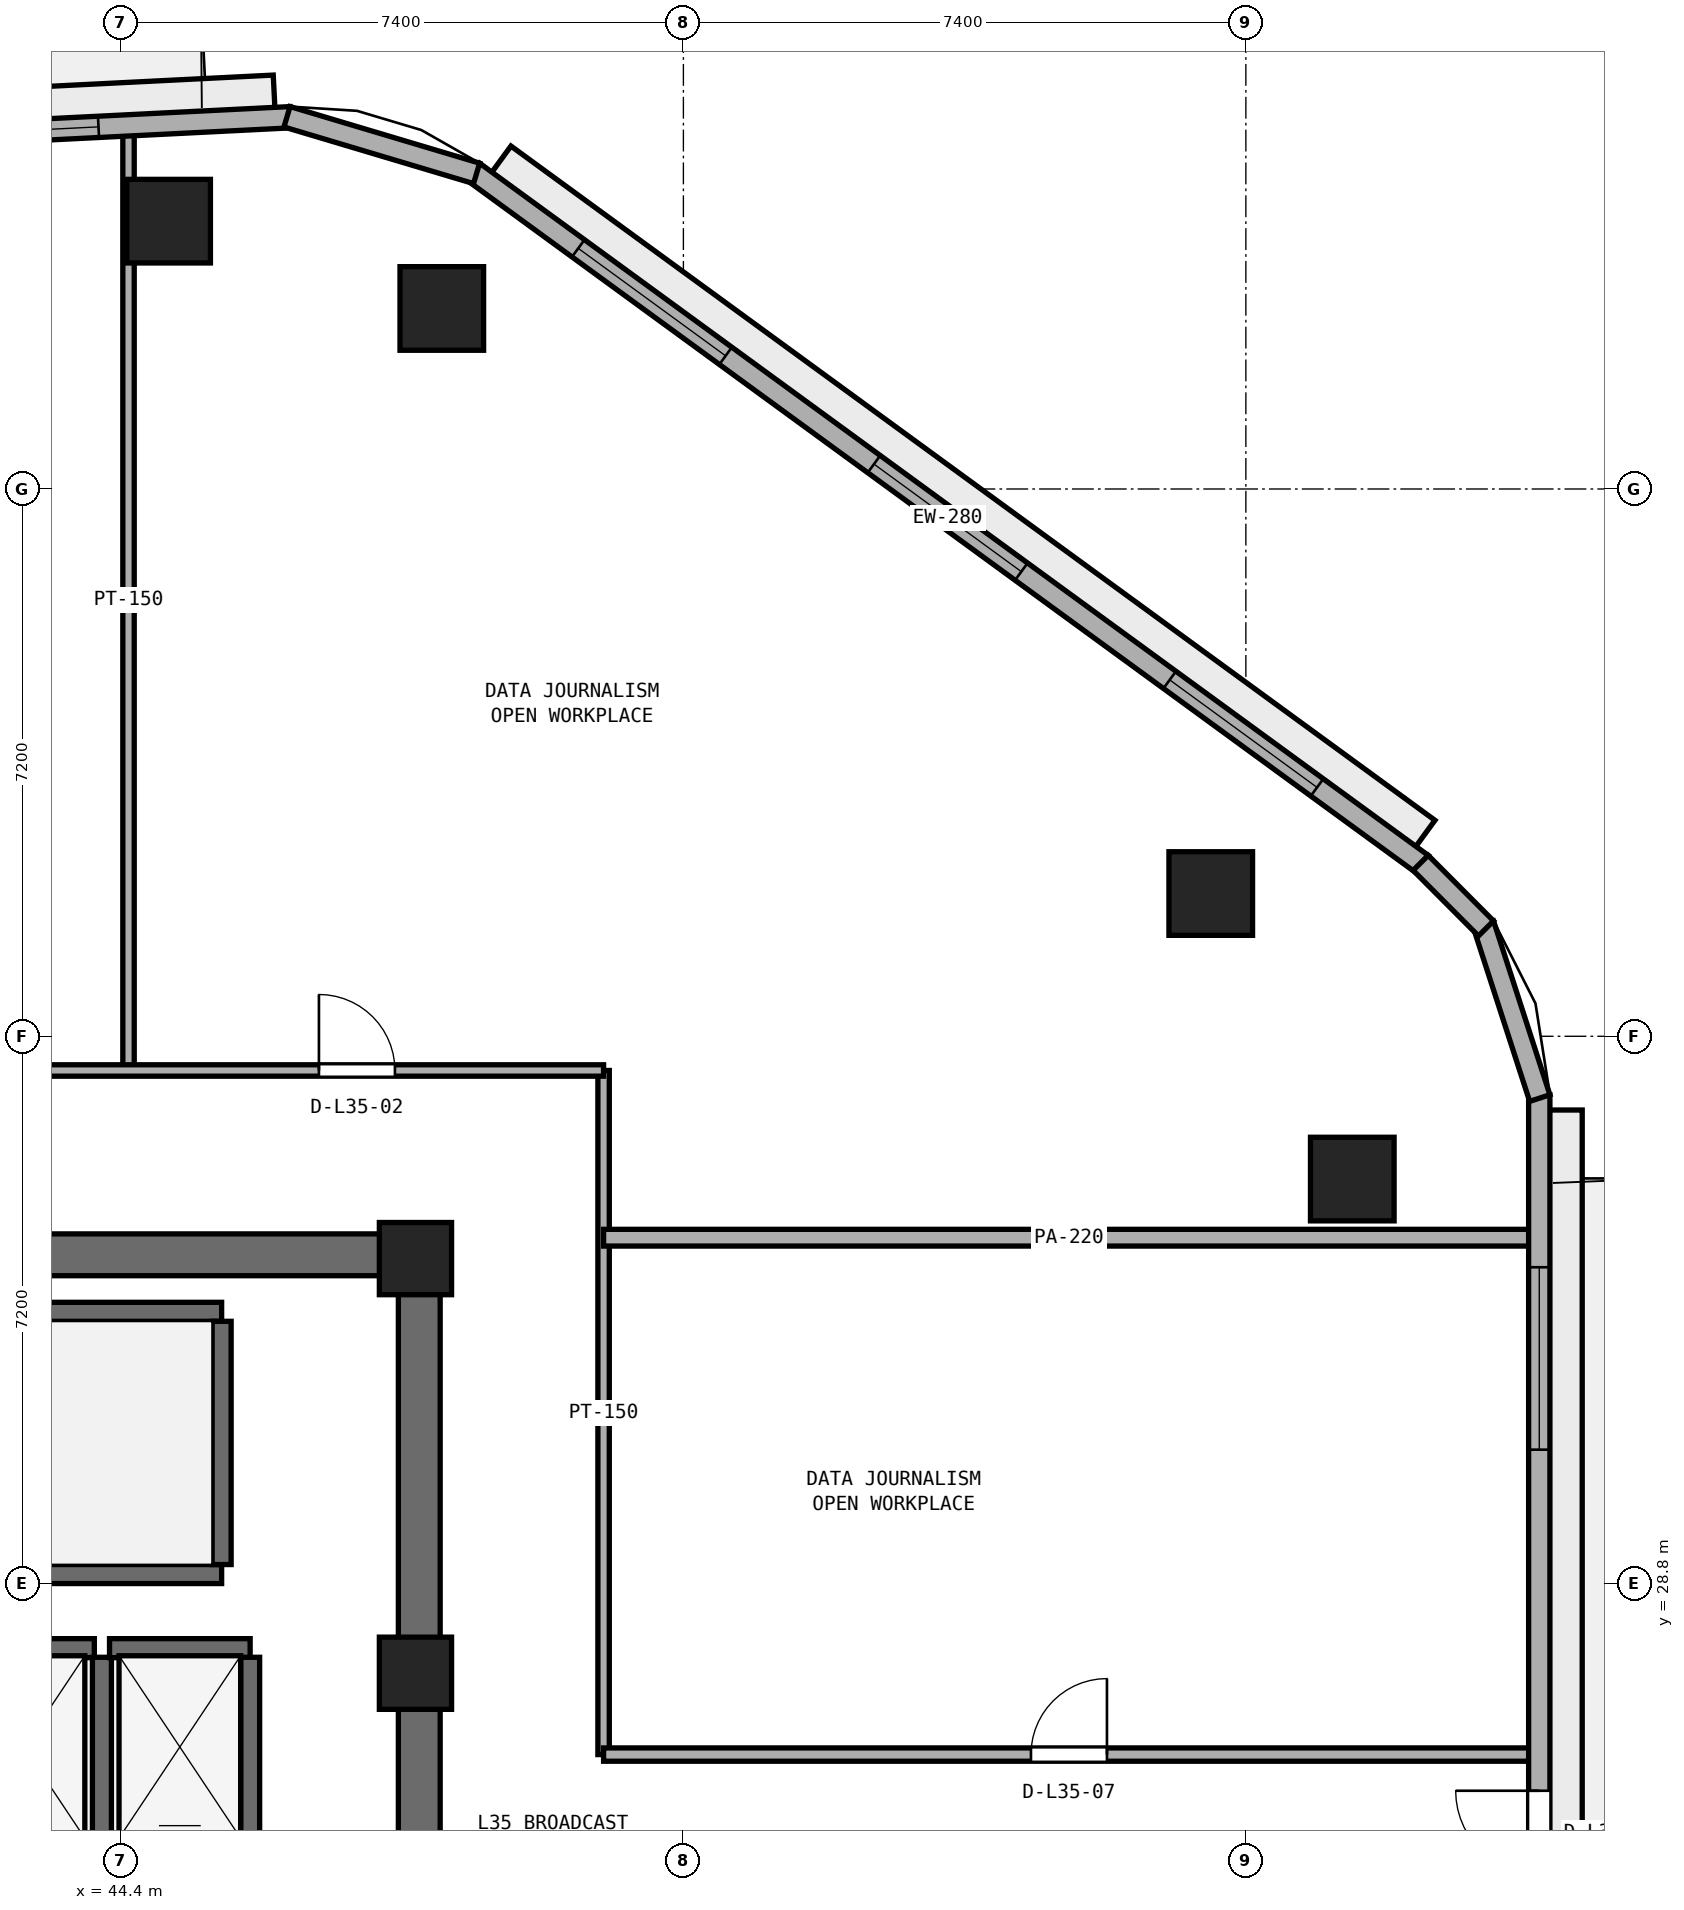
"""IFC4 building model, lengths in metres.
Left out: names, types, materials, properties, quantities, classifications, styles, units other than length and angle.
Written with IfcOpenShell. Run it as: python <this file> out.ifc"""

import sys

from ifc_helpers import new_model, si_unit, direction, frame, frame_2d, origin, origin_2d, place, context, subcontext, project, spatial, rectangle, extrude, element, fill, save


model = new_model("IFC4")
c1 = context("Model", 3, precision=1e-05, world=origin(), true_north=direction((0.0, 1.0)))
c2 = subcontext(c1, "Body", "Model", "MODEL_VIEW")
j1 = project(units=[si_unit("LENGTHUNIT", "METRE"), si_unit("PLANEANGLEUNIT", "RADIAN")], contexts=[c1])
p1 = place(None, origin())
s1 = spatial("IfcSite", under=j1, at=p1, CompositionType="ELEMENT")
p2 = place(p1, origin())
s2 = spatial("IfcBuilding", under=s1, at=p2, CompositionType="ELEMENT")
p3 = place(p2, frame((0.0, 0.0, 140.2)))
s3 = spatial("IfcBuildingStorey", under=s2, at=p3, CompositionType="ELEMENT", Elevation=140.2)
p4 = place(p3, frame((25.4, 33.125, 0.0), z_axis=(0.0, 0.0, 1.0), x_axis=(1.0, 0.0, 0.0)))
e1 = element("IfcWall", 1, at=p4, inside=s3, PredefinedType="SHEAR", context=c2, shape_type="SweptSolid", body=[
    extrude(rectangle(XDim=23.2, YDim=0.55, at=frame_2d((11.6, 0.0))), origin(), (0.0, 0.0, 1.0), 3.54),
])
p5 = place(p3, frame((48.325, 17.55, 0.0), z_axis=(0.0, 0.0, 1.0), x_axis=(0.0, 1.0, 0.0)))
e2 = element("IfcWall", 2, at=p5, inside=s3, PredefinedType="SHEAR", context=c2, shape_type="SweptSolid", body=[
    extrude(rectangle(XDim=15.3, YDim=0.55, at=frame_2d((7.65, 0.0))), origin(), (0.0, 0.0, 1.0), 3.54),
])
p6 = place(p5, frame((5.75, 0.0, 0.0)))
e3 = element("IfcOpeningElement", 3, at=p6, cuts=e2, PredefinedType="OPENING", context=c2, shape_type="SweptSolid", body=[
    extrude(rectangle(XDim=1.5, YDim=2.15, at=frame_2d((0.75, 1.075))), frame((0.0, 0.285, 0.0), z_axis=(0.0, -1.0, 0.0), x_axis=(1.0, 0.0, 0.0)), (0.0, 0.0, 1.0), 0.57),
])
for number, where, z_axis, x_axis in (
    (4, (48.275, 27.62, 0.0), (0.0, 0.0, 1.0), (1.0, 0.0, 0.0)),
    (5, (48.275, 33.075, 0.0), (0.0, 0.0, 1.0), (1.0, 0.0, 0.0)),
):
    element("IfcColumn", number, at=place(p3, frame(where, z_axis=z_axis, x_axis=x_axis)), inside=s3, PredefinedType="PILASTER", context=c2, shape_type="SweptSolid", body=[
        extrude(rectangle(XDim=0.95, YDim=0.95, at=origin_2d()), origin(), (0.0, 0.0, 1.0), 3.8),
    ])
for number, where, z_axis, x_axis in (
    (6, (60.6, 34.122, 0.0), (0.0, 0.0, 1.0), (1.0, 0.0, 0.0)),
    (7, (58.738, 37.878, 0.0), (0.0, 0.0, 1.0), (1.0, 0.0, 0.0)),
    (8, (48.622, 45.575, 0.0), (0.0, 0.0, 1.0), (1.0, 0.0, 0.0)),
    (9, (45.028, 46.724, 0.0), (0.0, 0.0, 1.0), (1.0, 0.0, 0.0)),
):
    element("IfcColumn", number, at=place(p3, frame(where, z_axis=z_axis, x_axis=x_axis)), inside=s3, PredefinedType="COLUMN", context=c2, shape_type="SweptSolid", body=[
        extrude(rectangle(XDim=1.1, YDim=1.1, at=origin_2d()), origin(), (0.0, 0.0, 1.0), 3.8),
    ])
for number, where, z_axis, x_axis in (
    (10, (38.425, 28.925, 0.0), (0.0, 0.0, 1.0), (1.0, 0.0, 0.0)),
    (11, (38.425, 32.375, 0.0), (0.0, 0.0, 1.0), (1.0, 0.0, 0.0)),
):
    element("IfcWall", number, at=place(p3, frame(where, z_axis=z_axis, x_axis=x_axis)), inside=s3, PredefinedType="SHEAR", context=c2, shape_type="SweptSolid", body=[
        extrude(rectangle(XDim=7.3, YDim=0.25, at=frame_2d((3.65, 0.0))), origin(), (0.0, 0.0, 1.0), 3.54),
    ])
p7 = place(p3, frame((45.725, 29.05, 0.0), z_axis=(0.0, 0.0, 1.0), x_axis=(0.0, 1.0, 0.0)))
e12 = element("IfcWall", 12, at=p7, inside=s3, PredefinedType="SHEAR", context=c2, shape_type="SweptSolid", body=[
    extrude(rectangle(XDim=3.2, YDim=0.25, at=frame_2d((1.6, 0.0))), origin(), (0.0, 0.0, 1.0), 3.54),
])
p8 = place(p3, frame((42.2, 27.95, 0.0), z_axis=(0.0, 0.0, 1.0), x_axis=(1.0, 0.0, 0.0)))
e13 = element("IfcWall", 13, at=p8, inside=s3, PredefinedType="SHEAR", context=c2, shape_type="SweptSolid", body=[
    extrude(rectangle(XDim=1.85, YDim=0.25, at=frame_2d((0.925, 0.0))), origin(), (0.0, 0.0, 1.0), 3.54),
])
p9 = place(p3, frame((44.15, 25.47, 0.0), z_axis=(0.0, 0.0, 1.0), x_axis=(0.0, 1.0, 0.0)))
e14 = element("IfcWall", 14, at=p9, inside=s3, PredefinedType="SHEAR", context=c2, shape_type="SweptSolid", body=[
    extrude(rectangle(XDim=2.36, YDim=0.25, at=frame_2d((1.18, 0.0))), origin(), (0.0, 0.0, 1.0), 3.54),
])
p10 = place(p3, frame((44.25, 27.95, 0.0), z_axis=(0.0, 0.0, 1.0), x_axis=(1.0, 0.0, 0.0)))
e15 = element("IfcWall", 15, at=p10, inside=s3, PredefinedType="SHEAR", context=c2, shape_type="SweptSolid", body=[
    extrude(rectangle(XDim=1.85, YDim=0.25, at=frame_2d((0.925, 0.0))), origin(), (0.0, 0.0, 1.0), 3.54),
])
p11 = place(p3, frame((46.1, 25.47, 0.0), z_axis=(0.0, 0.0, 1.0), x_axis=(0.0, 1.0, 0.0)))
e16 = element("IfcWall", 16, at=p11, inside=s3, PredefinedType="SHEAR", context=c2, shape_type="SweptSolid", body=[
    extrude(rectangle(XDim=2.36, YDim=0.25, at=frame_2d((1.18, 0.0))), origin(), (0.0, 0.0, 1.0), 3.54),
])
p12 = place(p3, frame((50.75, 26.55, 0.0), z_axis=(0.0, 0.0, 1.0), x_axis=(0.0, 1.0, 0.0)))
e17 = element("IfcWall", 17, at=p12, inside=s3, PredefinedType="PARTITIONING", context=c2, shape_type="SweptSolid", body=[
    extrude(rectangle(XDim=9.0, YDim=0.15, at=frame_2d((4.5, 0.0))), origin(), (0.0, 0.0, 1.0), 3.54),
])
p13 = place(p3, frame((44.5, 35.55, 0.0), z_axis=(0.0, 0.0, 1.0), x_axis=(0.0, 1.0, 0.0)))
e18 = element("IfcWall", 18, at=p13, inside=s3, PredefinedType="PARTITIONING", context=c2, shape_type="SweptSolid", body=[
    extrude(rectangle(XDim=12.369, YDim=0.15, at=frame_2d((6.185, 0.0))), origin(), (0.0, 0.0, 1.0), 3.54),
])
p14 = place(p3, frame((50.75, 26.55, 0.0), z_axis=(0.0, 0.0, 1.0), x_axis=(1.0, 0.0, 0.0)))
e19 = element("IfcWall", 19, at=p14, inside=s3, PredefinedType="PARTITIONING", context=c2, shape_type="SweptSolid", body=[
    extrude(rectangle(XDim=12.245, YDim=0.175, at=frame_2d((6.123, 0.0))), origin(), (0.0, 0.0, 1.0), 3.54),
])
p15 = place(p14, frame((5.623, 0.0, 0.0)))
e20 = element("IfcOpeningElement", 20, at=p15, cuts=e19, PredefinedType="OPENING", context=c2, shape_type="SweptSolid", body=[
    extrude(rectangle(XDim=1.0, YDim=2.12, at=frame_2d((0.5, 1.06))), frame((0.0, 0.097, 0.0), z_axis=(0.0, -1.0, 0.0), x_axis=(1.0, 0.0, 0.0)), (0.0, 0.0, 1.0), 0.195),
])
p16 = place(p3, frame((50.75, 33.35, 0.0), z_axis=(0.0, 0.0, 1.0), x_axis=(1.0, 0.0, 0.0)))
e21 = element("IfcWall", 21, at=p16, inside=s3, PredefinedType="PARTITIONING", context=c2, shape_type="SweptSolid", body=[
    extrude(rectangle(XDim=12.245, YDim=0.22, at=frame_2d((6.123, 0.0))), origin(), (0.0, 0.0, 1.0), 2.923),
])
p17 = place(p3, frame((23.25, 35.55, 0.0), z_axis=(0.0, 0.0, 1.0), x_axis=(1.0, 0.0, 0.0)))
e22 = element("IfcWall", 22, at=p17, inside=s3, PredefinedType="PARTITIONING", context=c2, shape_type="SweptSolid", body=[
    extrude(rectangle(XDim=27.5, YDim=0.15, at=frame_2d((13.75, 0.0))), origin(), (0.0, 0.0, 1.0), 3.54),
])
p18 = place(p17, frame((10.245, 0.0, 0.0)))
e23 = element("IfcOpeningElement", 23, at=p18, cuts=e22, PredefinedType="OPENING", context=c2, shape_type="SweptSolid", body=[
    extrude(rectangle(XDim=1.0, YDim=2.12, at=frame_2d((0.5, 1.06))), frame((0.0, 0.085, 0.0), z_axis=(0.0, -1.0, 0.0), x_axis=(1.0, 0.0, 0.0)), (0.0, 0.0, 1.0), 0.17),
])
p19 = place(p17, frame((23.755, 0.0, 0.0)))
e24 = element("IfcOpeningElement", 24, at=p19, cuts=e22, PredefinedType="OPENING", context=c2, shape_type="SweptSolid", body=[
    extrude(rectangle(XDim=1.0, YDim=2.12, at=frame_2d((0.5, 1.06))), frame((0.0, 0.085, 0.0), z_axis=(0.0, -1.0, 0.0), x_axis=(1.0, 0.0, 0.0)), (0.0, 0.0, 1.0), 0.17),
])
p20 = place(p3, frame((63.06, 16.418, 0.0), z_axis=(0.0, 0.0, 1.0), x_axis=(0.0, 1.0, 0.0)))
e25 = element("IfcWall", 25, at=p20, inside=s3, PredefinedType="STANDARD", context=c2, shape_type="SweptSolid", body=[
    extrude(rectangle(XDim=18.812, YDim=0.28, at=frame_2d((9.406, 0.0))), origin(), (0.0, 0.0, 1.0), 3.54),
])
p21 = place(p20, frame((8.556, 0.0, 0.0)))
e26 = element("IfcOpeningElement", 26, at=p21, cuts=e25, PredefinedType="OPENING", context=c2, shape_type="SweptSolid", body=[
    extrude(rectangle(XDim=1.1, YDim=2.2, at=frame_2d((0.55, 1.1))), frame((0.0, 0.15, 0.0), z_axis=(0.0, -1.0, 0.0), x_axis=(1.0, 0.0, 0.0)), (0.0, 0.0, 1.0), 0.3),
])
p22 = place(p20, frame((14.143, 0.0, 0.9)))
e27 = element("IfcOpeningElement", 27, at=p22, cuts=e25, PredefinedType="OPENING", context=c2, shape_type="SweptSolid", body=[
    extrude(rectangle(XDim=2.4, YDim=1.75, at=frame_2d((1.2, 0.875))), frame((0.0, 0.15, 0.0), z_axis=(0.0, -1.0, 0.0), x_axis=(1.0, 0.0, 0.0)), (0.0, 0.0, 1.0), 0.3),
])
p23 = place(p3, frame((61.516, 38.267, 0.0), z_axis=(0.0, 0.0, 1.0), x_axis=(-0.807812505785, 0.589439526582, 0.0)))
e28 = element("IfcWall", 28, at=p23, inside=s3, PredefinedType="STANDARD", context=c2, shape_type="SweptSolid", body=[
    extrude(rectangle(XDim=15.448, YDim=0.28, at=frame_2d((7.724, 0.0))), origin(), (0.0, 0.0, 1.0), 3.54),
])
p24 = place(p23, frame((1.708, 0.0, 0.9)))
e29 = element("IfcOpeningElement", 29, at=p24, cuts=e28, PredefinedType="OPENING", context=c2, shape_type="SweptSolid", body=[
    extrude(rectangle(XDim=2.4, YDim=1.75, at=frame_2d((1.2, 0.875))), frame((0.0, 0.15, 0.0), z_axis=(0.0, -1.0, 0.0), x_axis=(1.0, 0.0, 0.0)), (0.0, 0.0, 1.0), 0.3),
])
p25 = place(p23, frame((6.524, 0.0, 0.9)))
e30 = element("IfcOpeningElement", 30, at=p25, cuts=e28, PredefinedType="OPENING", context=c2, shape_type="SweptSolid", body=[
    extrude(rectangle(XDim=2.4, YDim=1.75, at=frame_2d((1.2, 0.875))), frame((0.0, 0.15, 0.0), z_axis=(0.0, -1.0, 0.0), x_axis=(1.0, 0.0, 0.0)), (0.0, 0.0, 1.0), 0.3),
])
p26 = place(p23, frame((11.34, 0.0, 0.9)))
e31 = element("IfcOpeningElement", 31, at=p26, cuts=e28, PredefinedType="OPENING", context=c2, shape_type="SweptSolid", body=[
    extrude(rectangle(XDim=2.4, YDim=1.75, at=frame_2d((1.2, 0.875))), frame((0.0, 0.15, 0.0), z_axis=(0.0, -1.0, 0.0), x_axis=(1.0, 0.0, 0.0)), (0.0, 0.0, 1.0), 0.3),
])
p27 = place(p3, frame((46.632, 48.091, 0.0), z_axis=(0.0, 0.0, 1.0), x_axis=(-0.998744129094, -0.050101542886, 0.0)))
e32 = element("IfcWall", 32, at=p27, inside=s3, PredefinedType="STANDARD", context=c2, shape_type="SweptSolid", body=[
    extrude(rectangle(XDim=17.382, YDim=0.28, at=frame_2d((8.691, 0.0))), origin(), (0.0, 0.0, 1.0), 3.54),
])
p28 = place(p27, frame((8.141, 0.0, 0.0)))
e33 = element("IfcOpeningElement", 33, at=p28, cuts=e32, PredefinedType="OPENING", context=c2, shape_type="SweptSolid", body=[
    extrude(rectangle(XDim=1.1, YDim=2.2, at=frame_2d((0.55, 1.1))), frame((0.0, 0.15, 0.0), z_axis=(0.0, -1.0, 0.0), x_axis=(1.0, 0.0, 0.0)), (0.0, 0.0, 1.0), 0.3),
])
p29 = place(p27, frame((2.53, 0.0, 0.9)))
e34 = element("IfcOpeningElement", 34, at=p29, cuts=e32, PredefinedType="OPENING", context=c2, shape_type="SweptSolid", body=[
    extrude(rectangle(XDim=2.4, YDim=1.75, at=frame_2d((1.2, 0.875))), frame((0.0, 0.15, 0.0), z_axis=(0.0, -1.0, 0.0), x_axis=(1.0, 0.0, 0.0)), (0.0, 0.0, 1.0), 0.3),
])
p30 = place(p27, frame((12.951, 0.0, 0.9)))
e35 = element("IfcOpeningElement", 35, at=p30, cuts=e32, PredefinedType="OPENING", context=c2, shape_type="SweptSolid", body=[
    extrude(rectangle(XDim=2.4, YDim=1.75, at=frame_2d((1.2, 0.875))), frame((0.0, 0.15, 0.0), z_axis=(0.0, -1.0, 0.0), x_axis=(1.0, 0.0, 0.0)), (0.0, 0.0, 1.0), 0.3),
])
p31 = place(p3, frame((63.067, 35.187, 0.0), z_axis=(0.0, 0.0, 1.0), x_axis=(-0.308390504294, 0.951259847182, 0.0)))
e36 = element("IfcWall", 36, at=p31, inside=s3, PredefinedType="STANDARD", context=c2, shape_type="SweptSolid", body=[
    extrude(rectangle(XDim=2.405, YDim=0.28, at=frame_2d((1.203, 0.0))), origin(), (0.0, 0.0, 1.0), 3.54),
])
p32 = place(p3, frame((62.359, 37.419, 0.0), z_axis=(0.0, 0.0, 1.0), x_axis=(-0.706003104649, 0.708208737751, 0.0)))
e37 = element("IfcWall", 37, at=p32, inside=s3, PredefinedType="STANDARD", context=c2, shape_type="SweptSolid", body=[
    extrude(rectangle(XDim=1.218, YDim=0.28, at=frame_2d((0.609, 0.0))), origin(), (0.0, 0.0, 1.0), 3.54),
])
p33 = place(p3, frame((49.079, 47.352, 0.0), z_axis=(0.0, 0.0, 1.0), x_axis=(-0.958207501709, 0.286074087726, 0.0)))
e38 = element("IfcWall", 38, at=p33, inside=s3, PredefinedType="STANDARD", context=c2, shape_type="SweptSolid", body=[
    extrude(rectangle(XDim=2.603, YDim=0.28, at=frame_2d((1.302, 0.0))), origin(), (0.0, 0.0, 1.0), 3.54),
])
p34 = place(p19, origin())
e39 = element("IfcDoor", 39, at=p34, inside=s3, OperationType="SINGLE_SWING_LEFT", PredefinedType="DOOR", context=c2, shape_type="SweptSolid", body=[
    extrude(rectangle(XDim=1.0, YDim=2.12, at=frame_2d((0.5, 1.06))), frame((0.0, 0.025, 0.0), z_axis=(0.0, -1.0, 0.0), x_axis=(1.0, 0.0, 0.0)), (0.0, 0.0, 1.0), 0.05),
])
fill(e24, e39)
p35 = place(p15, origin())
e40 = element("IfcDoor", 40, at=p35, inside=s3, OperationType="SINGLE_SWING_RIGHT", PredefinedType="DOOR", context=c2, shape_type="SweptSolid", body=[
    extrude(rectangle(XDim=1.0, YDim=2.12, at=frame_2d((0.5, 1.06))), frame((0.0, 0.025, 0.0), z_axis=(0.0, -1.0, 0.0), x_axis=(1.0, 0.0, 0.0)), (0.0, 0.0, 1.0), 0.05),
])
fill(e20, e40)
p36 = place(p21, origin())
e41 = element("IfcDoor", 41, at=p36, inside=s3, OperationType="SINGLE_SWING_RIGHT", PredefinedType="DOOR", context=c2, shape_type="SweptSolid", body=[
    extrude(rectangle(XDim=1.1, YDim=2.2, at=frame_2d((0.55, 1.1))), frame((0.0, 0.025, 0.0), z_axis=(0.0, -1.0, 0.0), x_axis=(1.0, 0.0, 0.0)), (0.0, 0.0, 1.0), 0.05),
])
fill(e26, e41)
p37 = place(p22, origin())
e42 = element("IfcWindow", 42, at=p37, inside=s3, PartitioningType="SINGLE_PANEL", PredefinedType="WINDOW", context=c2, shape_type="SweptSolid", body=[
    extrude(rectangle(XDim=2.4, YDim=1.75, at=frame_2d((1.2, 0.875))), frame((0.0, 0.03, 0.0), z_axis=(0.0, -1.0, 0.0), x_axis=(1.0, 0.0, 0.0)), (0.0, 0.0, 1.0), 0.06),
])
fill(e27, e42)
p38 = place(p24, origin())
e43 = element("IfcWindow", 43, at=p38, inside=s3, PartitioningType="SINGLE_PANEL", PredefinedType="WINDOW", context=c2, shape_type="SweptSolid", body=[
    extrude(rectangle(XDim=2.4, YDim=1.75, at=frame_2d((1.2, 0.875))), frame((0.0, 0.03, 0.0), z_axis=(0.0, -1.0, 0.0), x_axis=(1.0, 0.0, 0.0)), (0.0, 0.0, 1.0), 0.06),
])
fill(e29, e43)
p39 = place(p25, origin())
e44 = element("IfcWindow", 44, at=p39, inside=s3, PartitioningType="SINGLE_PANEL", PredefinedType="WINDOW", context=c2, shape_type="SweptSolid", body=[
    extrude(rectangle(XDim=2.4, YDim=1.75, at=frame_2d((1.2, 0.875))), frame((0.0, 0.03, 0.0), z_axis=(0.0, -1.0, 0.0), x_axis=(1.0, 0.0, 0.0)), (0.0, 0.0, 1.0), 0.06),
])
fill(e30, e44)
p40 = place(p26, origin())
e45 = element("IfcWindow", 45, at=p40, inside=s3, PartitioningType="SINGLE_PANEL", PredefinedType="WINDOW", context=c2, shape_type="SweptSolid", body=[
    extrude(rectangle(XDim=2.4, YDim=1.75, at=frame_2d((1.2, 0.875))), frame((0.0, 0.03, 0.0), z_axis=(0.0, -1.0, 0.0), x_axis=(1.0, 0.0, 0.0)), (0.0, 0.0, 1.0), 0.06),
])
fill(e31, e45)
p41 = place(p29, origin())
e46 = element("IfcWindow", 46, at=p41, inside=s3, PartitioningType="SINGLE_PANEL", PredefinedType="WINDOW", context=c2, shape_type="SweptSolid", body=[
    extrude(rectangle(XDim=2.4, YDim=1.75, at=frame_2d((1.2, 0.875))), frame((0.0, 0.03, 0.0), z_axis=(0.0, -1.0, 0.0), x_axis=(1.0, 0.0, 0.0)), (0.0, 0.0, 1.0), 0.06),
])
fill(e34, e46)
save(model, sys.argv[1])
